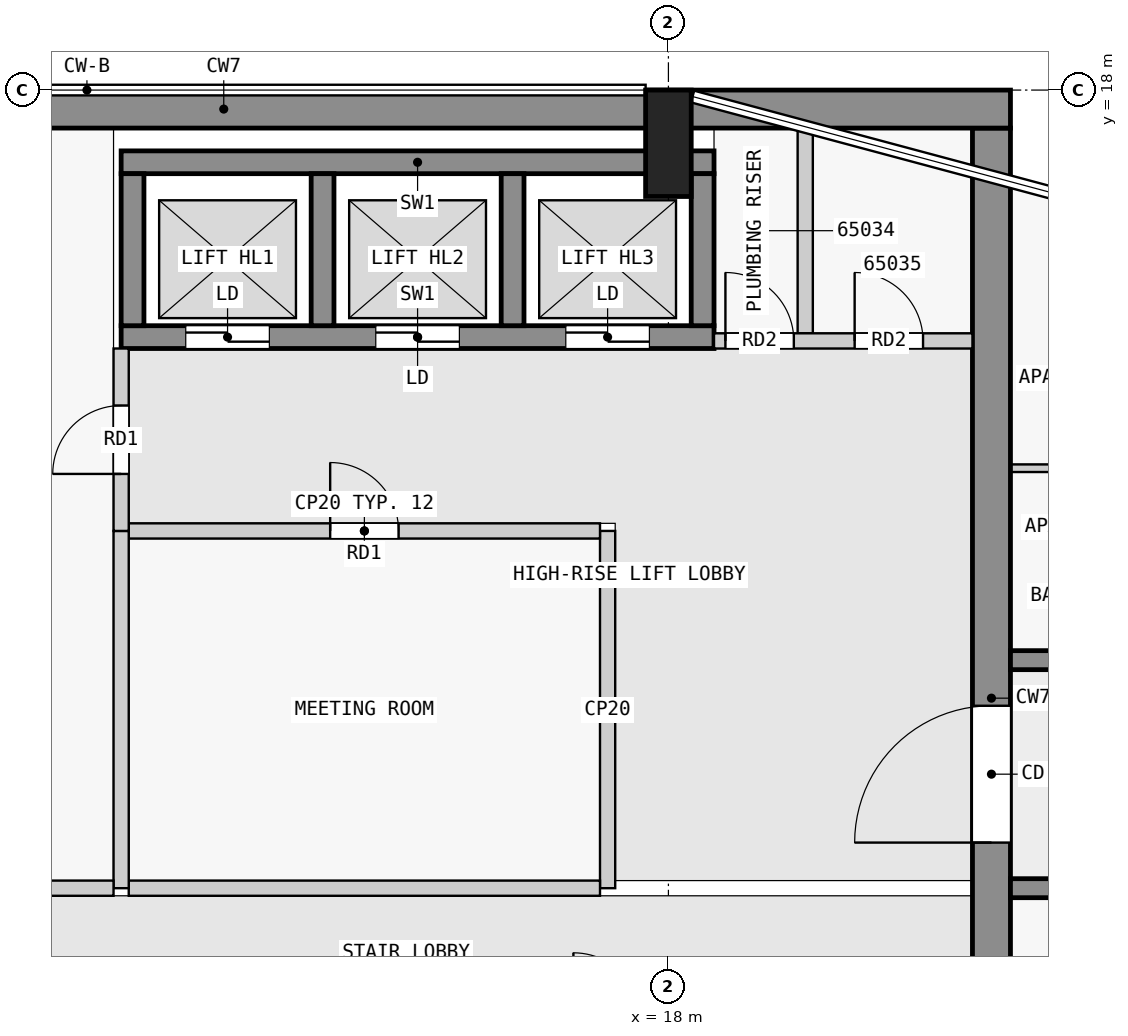
"""IFC4 building model, lengths in metres.
Left out: names, types, materials, properties, quantities, classifications, styles, units other than length and angle.
Written with IfcOpenShell. Run it as: python <this file> out.ifc"""

import sys

from ifc_helpers import new_model, si_unit, direction, frame, frame_2d, origin, origin_2d, place, context, subcontext, project, spatial, rectangle, extrude, element, fill, save


model = new_model("IFC4")
c1 = context("Model", 3, precision=1e-05, world=origin(), true_north=direction((0.0, 1.0)))
c2 = subcontext(c1, "Body", "Model", "MODEL_VIEW")
j1 = project(units=[si_unit("LENGTHUNIT", "METRE"), si_unit("PLANEANGLEUNIT", "RADIAN")], contexts=[c1])
p1 = place(None, origin())
s1 = spatial("IfcSite", under=j1, at=p1, CompositionType="ELEMENT")
p2 = place(p1, origin())
s2 = spatial("IfcBuilding", under=s1, at=p2, CompositionType="ELEMENT")
p3 = place(p2, frame((0.0, 0.0, 249.4)))
s3 = spatial("IfcBuildingStorey", under=s2, at=p3, CompositionType="ELEMENT", Elevation=249.4)
p4 = place(p3, frame((18.0, 17.3, 0.0), z_axis=(0.0, 0.0, 1.0), x_axis=(1.0, 0.0, 0.0)))
e1 = element("IfcColumn", 1, at=p4, inside=s3, PredefinedType="COLUMN", context=c2, shape_type="SweptSolid", body=[
    extrude(rectangle(XDim=0.6, YDim=1.4, at=origin_2d()), origin(), (0.0, 0.0, 1.0), 3.5),
])
p5 = place(p3, frame((1.8, 17.75, 0.0), z_axis=(0.0, 0.0, 1.0), x_axis=(1.0, 0.0, 0.0)))
e2 = element("IfcWall", 2, at=p5, inside=s3, PredefinedType="SHEAR", context=c2, shape_type="SweptSolid", body=[
    extrude(rectangle(XDim=20.7, YDim=0.5, at=frame_2d((10.35, 0.0))), origin(), (0.0, 0.0, 1.0), 3.25),
])
p6 = place(p3, frame((22.25, 2.5, 0.0), z_axis=(0.0, 0.0, 1.0), x_axis=(0.0, 1.0, 0.0)))
e3 = element("IfcWall", 3, at=p6, inside=s3, PredefinedType="SHEAR", context=c2, shape_type="SweptSolid", body=[
    extrude(rectangle(XDim=15.0, YDim=0.5, at=frame_2d((7.5, 0.0))), origin(), (0.0, 0.0, 1.0), 3.25),
])
p7 = place(p6, frame((5.6, 0.0, 0.0)))
e4 = element("IfcOpeningElement", 4, at=p7, cuts=e3, PredefinedType="OPENING", context=c2, shape_type="SweptSolid", body=[
    extrude(rectangle(XDim=1.8, YDim=2.1, at=frame_2d((0.9, 1.05))), frame((0.0, 0.26, 0.0), z_axis=(0.0, -1.0, 0.0), x_axis=(1.0, 0.0, 0.0)), (0.0, 0.0, 1.0), 0.52),
])
p8 = place(p3, frame((10.8, 17.05, 0.0), z_axis=(0.0, 0.0, 1.0), x_axis=(1.0, 0.0, 0.0)))
e5 = element("IfcWall", 5, at=p8, inside=s3, PredefinedType="SHEAR", context=c2, shape_type="SweptSolid", body=[
    extrude(rectangle(XDim=7.8, YDim=0.3, at=frame_2d((3.9, 0.0))), origin(), (0.0, 0.0, 1.0), 3.25),
])
p9 = place(p3, frame((10.8, 14.75, 0.0), z_axis=(0.0, 0.0, 1.0), x_axis=(1.0, 0.0, 0.0)))
e6 = element("IfcWall", 6, at=p9, inside=s3, PredefinedType="SHEAR", context=c2, shape_type="SweptSolid", body=[
    extrude(rectangle(XDim=7.8, YDim=0.3, at=frame_2d((3.9, 0.0))), origin(), (0.0, 0.0, 1.0), 3.25),
])
p10 = place(p9, frame((0.85, 0.0, 0.0)))
e7 = element("IfcOpeningElement", 7, at=p10, cuts=e6, PredefinedType="OPENING", context=c2, shape_type="SweptSolid", body=[
    extrude(rectangle(XDim=1.1, YDim=2.1, at=frame_2d((0.55, 1.05))), frame((0.0, 0.16, 0.0), z_axis=(0.0, -1.0, 0.0), x_axis=(1.0, 0.0, 0.0)), (0.0, 0.0, 1.0), 0.32),
])
p11 = place(p9, frame((3.35, 0.0, 0.0)))
e8 = element("IfcOpeningElement", 8, at=p11, cuts=e6, PredefinedType="OPENING", context=c2, shape_type="SweptSolid", body=[
    extrude(rectangle(XDim=1.1, YDim=2.1, at=frame_2d((0.55, 1.05))), frame((0.0, 0.16, 0.0), z_axis=(0.0, -1.0, 0.0), x_axis=(1.0, 0.0, 0.0)), (0.0, 0.0, 1.0), 0.32),
])
p12 = place(p9, frame((5.85, 0.0, 0.0)))
e9 = element("IfcOpeningElement", 9, at=p12, cuts=e6, PredefinedType="OPENING", context=c2, shape_type="SweptSolid", body=[
    extrude(rectangle(XDim=1.1, YDim=2.1, at=frame_2d((0.55, 1.05))), frame((0.0, 0.16, 0.0), z_axis=(0.0, -1.0, 0.0), x_axis=(1.0, 0.0, 0.0)), (0.0, 0.0, 1.0), 0.32),
])
for number, where, z_axis, x_axis in (
    (10, (10.95, 14.9, 0.0), (0.0, 0.0, 1.0), (0.0, 1.0, 0.0)),
    (11, (13.45, 14.9, 0.0), (0.0, 0.0, 1.0), (0.0, 1.0, 0.0)),
    (12, (15.95, 14.9, 0.0), (0.0, 0.0, 1.0), (0.0, 1.0, 0.0)),
    (13, (18.45, 14.9, 0.0), (0.0, 0.0, 1.0), (0.0, 1.0, 0.0)),
):
    element("IfcWall", number, at=place(p3, frame(where, z_axis=z_axis, x_axis=x_axis)), inside=s3, PredefinedType="SHEAR", context=c2, shape_type="SweptSolid", body=[
        extrude(rectangle(XDim=2.0, YDim=0.3, at=frame_2d((1.0, 0.0))), origin(), (0.0, 0.0, 1.0), 3.25),
    ])
p13 = place(p3, frame((22.5, 7.5, 0.0), z_axis=(0.0, 0.0, 1.0), x_axis=(1.0, 0.0, 0.0)))
e14 = element("IfcWall", 14, at=p13, inside=s3, PredefinedType="SHEAR", context=c2, shape_type="SweptSolid", body=[
    extrude(rectangle(XDim=22.5, YDim=0.25, at=frame_2d((11.25, 0.0))), origin(), (0.0, 0.0, 1.0), 3.25),
])
p14 = place(p13, frame((1.75, 0.0, 0.0)))
e15 = element("IfcOpeningElement", 15, at=p14, cuts=e14, PredefinedType="OPENING", context=c2, shape_type="SweptSolid", body=[
    extrude(rectangle(XDim=1.0, YDim=2.1, at=frame_2d((0.5, 1.05))), frame((0.0, 0.135, 0.0), z_axis=(0.0, -1.0, 0.0), x_axis=(1.0, 0.0, 0.0)), (0.0, 0.0, 1.0), 0.27),
])
p15 = place(p13, frame((5.85, 0.0, 0.0)))
e16 = element("IfcOpeningElement", 16, at=p15, cuts=e14, PredefinedType="OPENING", context=c2, shape_type="SweptSolid", body=[
    extrude(rectangle(XDim=1.8, YDim=2.1, at=frame_2d((0.9, 1.05))), frame((0.0, 0.135, 0.0), z_axis=(0.0, -1.0, 0.0), x_axis=(1.0, 0.0, 0.0)), (0.0, 0.0, 1.0), 0.27),
])
p16 = place(p13, frame((13.05, 0.0, 0.0)))
e17 = element("IfcOpeningElement", 17, at=p16, cuts=e14, PredefinedType="OPENING", context=c2, shape_type="SweptSolid", body=[
    extrude(rectangle(XDim=1.0, YDim=2.1, at=frame_2d((0.5, 1.05))), frame((0.0, 0.135, 0.0), z_axis=(0.0, -1.0, 0.0), x_axis=(1.0, 0.0, 0.0)), (0.0, 0.0, 1.0), 0.27),
])
p17 = place(p13, frame((18.75, 0.0, 0.0)))
e18 = element("IfcOpeningElement", 18, at=p17, cuts=e14, PredefinedType="OPENING", context=c2, shape_type="SweptSolid", body=[
    extrude(rectangle(XDim=0.9, YDim=2.1, at=frame_2d((0.45, 1.05))), frame((0.0, 0.135, 0.0), z_axis=(0.0, -1.0, 0.0), x_axis=(1.0, 0.0, 0.0)), (0.0, 0.0, 1.0), 0.27),
])
p18 = place(p13, frame((20.95, 0.0, 0.0)))
e19 = element("IfcOpeningElement", 19, at=p18, cuts=e14, PredefinedType="OPENING", context=c2, shape_type="SweptSolid", body=[
    extrude(rectangle(XDim=1.0, YDim=2.1, at=frame_2d((0.5, 1.05))), frame((0.0, 0.135, 0.0), z_axis=(0.0, -1.0, 0.0), x_axis=(1.0, 0.0, 0.0)), (0.0, 0.0, 1.0), 0.27),
])
p19 = place(p3, frame((22.5, 10.5, 0.0), z_axis=(0.0, 0.0, 1.0), x_axis=(1.0, 0.0, 0.0)))
e20 = element("IfcWall", 20, at=p19, inside=s3, PredefinedType="SHEAR", context=c2, shape_type="SweptSolid", body=[
    extrude(rectangle(XDim=22.5, YDim=0.25, at=frame_2d((11.25, 0.0))), origin(), (0.0, 0.0, 1.0), 3.25),
])
p20 = place(p19, frame((4.05, 0.0, 0.0)))
e21 = element("IfcOpeningElement", 21, at=p20, cuts=e20, PredefinedType="OPENING", context=c2, shape_type="SweptSolid", body=[
    extrude(rectangle(XDim=1.0, YDim=2.1, at=frame_2d((0.5, 1.05))), frame((0.0, 0.135, 0.0), z_axis=(0.0, -1.0, 0.0), x_axis=(1.0, 0.0, 0.0)), (0.0, 0.0, 1.0), 0.27),
])
p21 = place(p19, frame((10.75, 0.0, 0.0)))
e22 = element("IfcOpeningElement", 22, at=p21, cuts=e20, PredefinedType="OPENING", context=c2, shape_type="SweptSolid", body=[
    extrude(rectangle(XDim=1.0, YDim=2.1, at=frame_2d((0.5, 1.05))), frame((0.0, 0.135, 0.0), z_axis=(0.0, -1.0, 0.0), x_axis=(1.0, 0.0, 0.0)), (0.0, 0.0, 1.0), 0.27),
])
p22 = place(p19, frame((16.85, 0.0, 0.0)))
e23 = element("IfcOpeningElement", 23, at=p22, cuts=e20, PredefinedType="OPENING", context=c2, shape_type="SweptSolid", body=[
    extrude(rectangle(XDim=1.0, YDim=2.1, at=frame_2d((0.5, 1.05))), frame((0.0, 0.135, 0.0), z_axis=(0.0, -1.0, 0.0), x_axis=(1.0, 0.0, 0.0)), (0.0, 0.0, 1.0), 0.27),
])
p23 = place(p3, frame((7.1, 7.5, 0.0), z_axis=(0.0, 0.0, 1.0), x_axis=(1.0, 0.0, 0.0)))
e24 = element("IfcWall", 24, at=p23, inside=s3, PredefinedType="PARTITIONING", context=c2, shape_type="SweptSolid", body=[
    extrude(rectangle(XDim=3.6, YDim=0.2, at=frame_2d((1.8, 0.0))), origin(), (0.0, 0.0, 1.0), 3.25),
])
p24 = place(p3, frame((10.8, 12.2, 0.0), z_axis=(0.0, 0.0, 1.0), x_axis=(0.0, 1.0, 0.0)))
e25 = element("IfcWall", 25, at=p24, inside=s3, PredefinedType="PARTITIONING", context=c2, shape_type="SweptSolid", body=[
    extrude(rectangle(XDim=2.4, YDim=0.2, at=frame_2d((1.2, 0.0))), origin(), (0.0, 0.0, 1.0), 3.25),
])
p25 = place(p24, frame((0.75, 0.0, 0.0)))
e26 = element("IfcOpeningElement", 26, at=p25, cuts=e25, PredefinedType="OPENING", context=c2, shape_type="SweptSolid", body=[
    extrude(rectangle(XDim=0.9, YDim=2.1, at=frame_2d((0.45, 1.05))), frame((0.0, 0.11, 0.0), z_axis=(0.0, -1.0, 0.0), x_axis=(1.0, 0.0, 0.0)), (0.0, 0.0, 1.0), 0.22),
])
p26 = place(p3, frame((10.8, 7.5, 0.0), z_axis=(0.0, 0.0, 1.0), x_axis=(0.0, 1.0, 0.0)))
e27 = element("IfcWall", 27, at=p26, inside=s3, PredefinedType="PARTITIONING", context=c2, shape_type="SweptSolid", body=[
    extrude(rectangle(XDim=4.7, YDim=0.2, at=frame_2d((2.35, 0.0))), origin(), (0.0, 0.0, 1.0), 3.25),
])
p27 = place(p3, frame((10.9, 7.5, 0.0), z_axis=(0.0, 0.0, 1.0), x_axis=(1.0, 0.0, 0.0)))
e28 = element("IfcWall", 28, at=p27, inside=s3, PredefinedType="PARTITIONING", context=c2, shape_type="SweptSolid", body=[
    extrude(rectangle(XDim=6.2, YDim=0.2, at=frame_2d((3.1, 0.0))), origin(), (0.0, 0.0, 1.0), 3.25),
])
p28 = place(p3, frame((17.2, 7.5, 0.0), z_axis=(0.0, 0.0, 1.0), x_axis=(0.0, 1.0, 0.0)))
e29 = element("IfcWall", 29, at=p28, inside=s3, PredefinedType="PARTITIONING", context=c2, shape_type="SweptSolid", body=[
    extrude(rectangle(XDim=4.7, YDim=0.2, at=frame_2d((2.35, 0.0))), origin(), (0.0, 0.0, 1.0), 3.25),
])
p29 = place(p3, frame((10.9, 12.2, 0.0), z_axis=(0.0, 0.0, 1.0), x_axis=(1.0, 0.0, 0.0)))
e30 = element("IfcWall", 30, at=p29, inside=s3, PredefinedType="PARTITIONING", context=c2, shape_type="SweptSolid", body=[
    extrude(rectangle(XDim=6.2, YDim=0.2, at=frame_2d((3.1, 0.0))), origin(), (0.0, 0.0, 1.0), 3.25),
])
p30 = place(p29, frame((2.65, 0.0, 0.0)))
e31 = element("IfcOpeningElement", 31, at=p30, cuts=e30, PredefinedType="OPENING", context=c2, shape_type="SweptSolid", body=[
    extrude(rectangle(XDim=0.9, YDim=2.1, at=frame_2d((0.45, 1.05))), frame((0.0, 0.11, 0.0), z_axis=(0.0, -1.0, 0.0), x_axis=(1.0, 0.0, 0.0)), (0.0, 0.0, 1.0), 0.22),
])
p31 = place(p3, frame((18.6, 14.7, 0.0), z_axis=(0.0, 0.0, 1.0), x_axis=(1.0, 0.0, 0.0)))
e32 = element("IfcWall", 32, at=p31, inside=s3, PredefinedType="PARTITIONING", context=c2, shape_type="SweptSolid", body=[
    extrude(rectangle(XDim=3.4, YDim=0.2, at=frame_2d((1.7, 0.0))), origin(), (0.0, 0.0, 1.0), 3.25),
])
p32 = place(p31, frame((0.15, 0.0, 0.0)))
e33 = element("IfcOpeningElement", 33, at=p32, cuts=e32, PredefinedType="OPENING", context=c2, shape_type="SweptSolid", body=[
    extrude(rectangle(XDim=0.9, YDim=2.1, at=frame_2d((0.45, 1.05))), frame((0.0, 0.11, 0.0), z_axis=(0.0, -1.0, 0.0), x_axis=(1.0, 0.0, 0.0)), (0.0, 0.0, 1.0), 0.22),
])
p33 = place(p31, frame((1.85, 0.0, 0.0)))
e34 = element("IfcOpeningElement", 34, at=p33, cuts=e32, PredefinedType="OPENING", context=c2, shape_type="SweptSolid", body=[
    extrude(rectangle(XDim=0.9, YDim=2.1, at=frame_2d((0.45, 1.05))), frame((0.0, 0.11, 0.0), z_axis=(0.0, -1.0, 0.0), x_axis=(1.0, 0.0, 0.0)), (0.0, 0.0, 1.0), 0.22),
])
p34 = place(p3, frame((19.8, 14.8, 0.0), z_axis=(0.0, 0.0, 1.0), x_axis=(0.0, 1.0, 0.0)))
e35 = element("IfcWall", 35, at=p34, inside=s3, PredefinedType="PARTITIONING", context=c2, shape_type="SweptSolid", body=[
    extrude(rectangle(XDim=2.7, YDim=0.2, at=frame_2d((1.35, 0.0))), origin(), (0.0, 0.0, 1.0), 3.25),
])
p35 = place(p3, frame((24.25, 13.025, 0.0), z_axis=(0.0, 0.0, 1.0), x_axis=(-1.0, 0.0, 0.0)))
e36 = element("IfcWall", 36, at=p35, inside=s3, PredefinedType="PARTITIONING", context=c2, shape_type="SweptSolid", body=[
    extrude(rectangle(XDim=1.75, YDim=0.1, at=frame_2d((0.875, 0.0))), origin(), (0.0, 0.0, 1.0), 3.25),
])
p36 = place(p25, origin())
e37 = element("IfcDoor", 37, at=p36, inside=s3, OperationType="SINGLE_SWING_LEFT", PredefinedType="DOOR", context=c2, shape_type="SweptSolid", body=[
    extrude(rectangle(XDim=0.9, YDim=2.1, at=frame_2d((0.45, 1.05))), frame((0.0, 0.025, 0.0), z_axis=(0.0, -1.0, 0.0), x_axis=(1.0, 0.0, 0.0)), (0.0, 0.0, 1.0), 0.05),
])
fill(e26, e37)
p37 = place(p30, origin())
e38 = element("IfcDoor", 38, at=p37, inside=s3, OperationType="SINGLE_SWING_LEFT", PredefinedType="DOOR", context=c2, shape_type="SweptSolid", body=[
    extrude(rectangle(XDim=0.9, YDim=2.1, at=frame_2d((0.45, 1.05))), frame((0.0, 0.025, 0.0), z_axis=(0.0, -1.0, 0.0), x_axis=(1.0, 0.0, 0.0)), (0.0, 0.0, 1.0), 0.05),
])
fill(e31, e38)
p38 = place(p10, origin())
e39 = element("IfcDoor", 39, at=p38, inside=s3, OperationType="DOUBLE_DOOR_SLIDING", PredefinedType="DOOR", context=c2, shape_type="SweptSolid", body=[
    extrude(rectangle(XDim=1.1, YDim=2.1, at=frame_2d((0.55, 1.05))), frame((0.0, 0.025, 0.0), z_axis=(0.0, -1.0, 0.0), x_axis=(1.0, 0.0, 0.0)), (0.0, 0.0, 1.0), 0.05),
])
fill(e7, e39)
p39 = place(p11, origin())
e40 = element("IfcDoor", 40, at=p39, inside=s3, OperationType="DOUBLE_DOOR_SLIDING", PredefinedType="DOOR", context=c2, shape_type="SweptSolid", body=[
    extrude(rectangle(XDim=1.1, YDim=2.1, at=frame_2d((0.55, 1.05))), frame((0.0, 0.025, 0.0), z_axis=(0.0, -1.0, 0.0), x_axis=(1.0, 0.0, 0.0)), (0.0, 0.0, 1.0), 0.05),
])
fill(e8, e40)
p40 = place(p12, origin())
e41 = element("IfcDoor", 41, at=p40, inside=s3, OperationType="DOUBLE_DOOR_SLIDING", PredefinedType="DOOR", context=c2, shape_type="SweptSolid", body=[
    extrude(rectangle(XDim=1.1, YDim=2.1, at=frame_2d((0.55, 1.05))), frame((0.0, 0.025, 0.0), z_axis=(0.0, -1.0, 0.0), x_axis=(1.0, 0.0, 0.0)), (0.0, 0.0, 1.0), 0.05),
])
fill(e9, e41)
p41 = place(p7, origin())
e42 = element("IfcDoor", 42, at=p41, inside=s3, OperationType="DOUBLE_DOOR_SINGLE_SWING", PredefinedType="DOOR", context=c2, shape_type="SweptSolid", body=[
    extrude(rectangle(XDim=1.8, YDim=2.1, at=frame_2d((0.9, 1.05))), frame((0.0, 0.025, 0.0), z_axis=(0.0, -1.0, 0.0), x_axis=(1.0, 0.0, 0.0)), (0.0, 0.0, 1.0), 0.05),
])
fill(e4, e42)
p42 = place(p32, origin())
e43 = element("IfcDoor", 43, at=p42, inside=s3, OperationType="SINGLE_SWING_LEFT", PredefinedType="DOOR", context=c2, shape_type="SweptSolid", body=[
    extrude(rectangle(XDim=0.9, YDim=2.1, at=frame_2d((0.45, 1.05))), frame((0.0, 0.025, 0.0), z_axis=(0.0, -1.0, 0.0), x_axis=(1.0, 0.0, 0.0)), (0.0, 0.0, 1.0), 0.05),
])
fill(e33, e43)
p43 = place(p33, origin())
e44 = element("IfcDoor", 44, at=p43, inside=s3, OperationType="SINGLE_SWING_LEFT", PredefinedType="DOOR", context=c2, shape_type="SweptSolid", body=[
    extrude(rectangle(XDim=0.9, YDim=2.1, at=frame_2d((0.45, 1.05))), frame((0.0, 0.025, 0.0), z_axis=(0.0, -1.0, 0.0), x_axis=(1.0, 0.0, 0.0)), (0.0, 0.0, 1.0), 0.05),
])
fill(e34, e44)
save(model, sys.argv[1])
